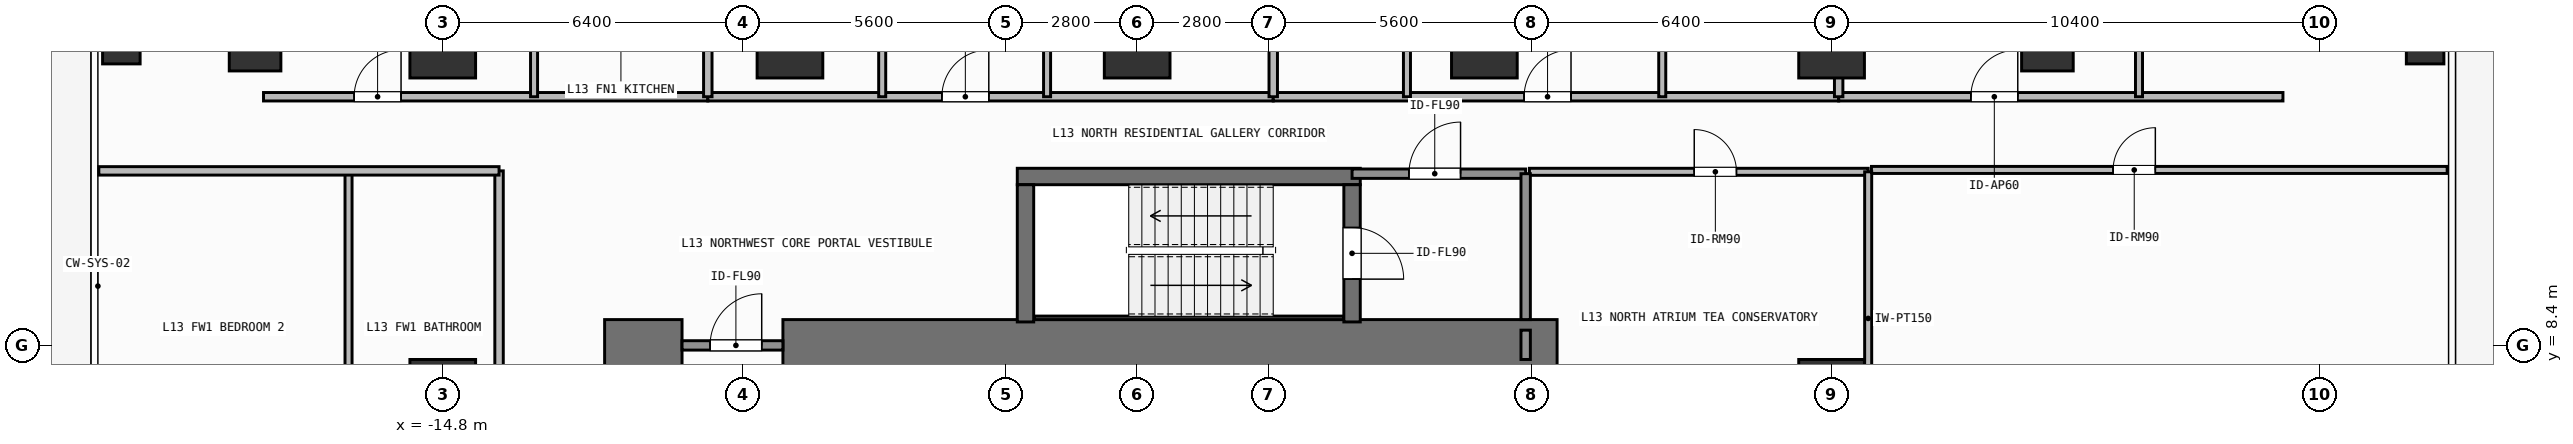
"""IFC4 building model, lengths in metres.
Left out: names, types, materials, properties, quantities, classifications, styles, units other than length and angle.
Written with IfcOpenShell. Run it as: python <this file> out.ifc"""

import sys

from ifc_helpers import new_model, si_unit, direction, frame, frame_2d, origin, origin_2d, place, context, subcontext, project, spatial, rectangle, hollow_rectangle, extrude, element, fill, save


model = new_model("IFC4")
c1 = context("Model", 3, precision=1e-05, world=origin(), true_north=direction((0.0, 1.0)))
c2 = subcontext(c1, "Body", "Model", "MODEL_VIEW")
j1 = project(units=[si_unit("LENGTHUNIT", "METRE"), si_unit("PLANEANGLEUNIT", "RADIAN")], contexts=[c1])
p1 = place(None, origin())
s1 = spatial("IfcSite", under=j1, at=p1, CompositionType="ELEMENT")
p2 = place(p1, origin())
s2 = spatial("IfcBuilding", under=s1, at=p2, CompositionType="ELEMENT")
p3 = place(p2, frame((0.0, 0.0, 50.1)))
s3 = spatial("IfcBuildingStorey", under=s2, at=p3, CompositionType="ELEMENT", Elevation=50.1)
p4 = place(p3, frame((-11.35, 8.4, 0.0), z_axis=(0.0, 0.0, 1.0), x_axis=(1.0, 0.0, 0.0)))
e1 = element("IfcWall", 1, at=p4, inside=s3, PredefinedType="SHEAR", context=c2, shape_type="SweptSolid", body=[
    extrude(rectangle(XDim=1.65, YDim=1.1, at=frame_2d((0.825, 0.0))), origin(), (0.0, 0.0, 1.0), 3.9),
])
p5 = place(p3, frame((-7.55, 8.4, 0.0), z_axis=(0.0, 0.0, 1.0), x_axis=(1.0, 0.0, 0.0)))
e2 = element("IfcWall", 2, at=p5, inside=s3, PredefinedType="SHEAR", context=c2, shape_type="SweptSolid", body=[
    extrude(rectangle(XDim=16.5, YDim=1.1, at=frame_2d((8.25, 0.0))), origin(), (0.0, 0.0, 1.0), 3.9),
])
p6 = place(p3, frame((-2.555, 12.0, 0.0), z_axis=(0.0, 0.0, 1.0), x_axis=(1.0, 0.0, 0.0)))
e3 = element("IfcWall", 3, at=p6, inside=s3, PredefinedType="SHEAR", context=c2, shape_type="SweptSolid", body=[
    extrude(rectangle(XDim=7.31, YDim=0.35, at=frame_2d((3.655, 0.0))), origin(), (0.0, 0.0, 1.0), 3.9),
])
p7 = place(p3, frame((-2.2, 8.988, 0.0), z_axis=(0.0, 0.0, 1.0), x_axis=(1.0, 0.0, 0.0)))
e4 = element("IfcWall", 4, at=p7, inside=s3, PredefinedType="SHEAR", context=c2, shape_type="SweptSolid", body=[
    extrude(rectangle(XDim=6.6, YDim=0.075, at=frame_2d((3.3, 0.0))), origin(), (0.0, 0.0, 1.0), 3.9),
])
p8 = place(p3, frame((-2.38, 8.9, 0.0), z_axis=(0.0, 0.0, 1.0), x_axis=(0.0, 1.0, 0.0)))
e5 = element("IfcWall", 5, at=p8, inside=s3, PredefinedType="SHEAR", context=c2, shape_type="SweptSolid", body=[
    extrude(rectangle(XDim=2.925, YDim=0.35, at=frame_2d((1.462, 0.0))), origin(), (0.0, 0.0, 1.0), 3.9),
])
p9 = place(p3, frame((4.58, 11.825, 0.0), z_axis=(0.0, 0.0, 1.0), x_axis=(0.0, -1.0, 0.0)))
e6 = element("IfcWall", 6, at=p9, inside=s3, PredefinedType="SHEAR", context=c2, shape_type="SweptSolid", body=[
    extrude(rectangle(XDim=2.925, YDim=0.35, at=frame_2d((1.462, 0.0))), origin(), (0.0, 0.0, 1.0), 3.9),
])
p10 = place(p9, frame((0.913, 0.0, 0.0)))
e7 = element("IfcOpeningElement", 7, at=p10, cuts=e6, PredefinedType="OPENING", context=c2, shape_type="SweptSolid", body=[
    extrude(rectangle(XDim=1.1, YDim=2.15, at=frame_2d((0.55, 1.075))), frame((0.0, 0.185, 0.0), z_axis=(0.0, -1.0, 0.0), x_axis=(1.0, 0.0, 0.0)), (0.0, 0.0, 1.0), 0.37),
])
for number, where, z_axis, x_axis in (
    (8, (-14.8, 14.8, 0.0), (0.0, 0.0, 1.0), (1.0, 0.0, 0.0)),
    (9, (-7.4, 14.8, 0.0), (0.0, 0.0, 1.0), (1.0, 0.0, 0.0)),
    (10, (0.0, 14.8, 0.0), (0.0, 0.0, 1.0), (1.0, 0.0, 0.0)),
    (11, (7.4, 14.8, 0.0), (0.0, 0.0, 1.0), (1.0, 0.0, 0.0)),
    (12, (14.8, 14.8, 0.0), (0.0, 0.0, 1.0), (1.0, 0.0, 0.0)),
    (13, (-14.8, 7.4, 0.0), (0.0, 0.0, 1.0), (1.0, 0.0, 0.0)),
    (14, (14.8, 7.4, 0.0), (0.0, 0.0, 1.0), (1.0, 0.0, 0.0)),
):
    element("IfcColumn", number, at=place(p3, frame(where, z_axis=z_axis, x_axis=x_axis)), inside=s3, PredefinedType="COLUMN", context=c2, shape_type="SweptSolid", body=[
        extrude(rectangle(XDim=1.4, YDim=1.4, at=origin_2d()), origin(), (0.0, 0.0, 1.0), 3.9),
    ])
for number, where, z_axis, x_axis in (
    (15, (-18.8, 14.8, 0.0), (0.0, 0.0, 1.0), (1.0, 0.0, 0.0)),
    (16, (19.4, 14.8, 0.0), (0.0, 0.0, 1.0), (1.0, 0.0, 0.0)),
):
    element("IfcColumn", number, at=place(p3, frame(where, z_axis=z_axis, x_axis=x_axis)), inside=s3, PredefinedType="COLUMN", context=c2, shape_type="SweptSolid", body=[
        extrude(rectangle(XDim=1.1, YDim=1.1, at=origin_2d()), origin(), (0.0, 0.0, 1.0), 3.9),
    ])
for number, where, z_axis, x_axis in (
    (17, (-21.65, 14.8, 0.0), (0.0, 0.0, 1.0), (1.0, 0.0, 0.0)),
    (18, (27.45, 14.8, 0.0), (0.0, 0.0, 1.0), (1.0, 0.0, 0.0)),
):
    element("IfcColumn", number, at=place(p3, frame(where, z_axis=z_axis, x_axis=x_axis)), inside=s3, PredefinedType="COLUMN", context=c2, shape_type="SweptSolid", body=[
        extrude(hollow_rectangle(XDim=0.8, YDim=0.8, WallThickness=0.036, at=origin_2d()), origin(), (0.0, 0.0, 1.0), 3.9),
    ])
p11 = place(p3, frame((4.58, 12.06, 0.0), z_axis=(0.0, 0.0, 1.0), x_axis=(1.0, 0.0, 0.0)))
e19 = element("IfcWall", 19, at=p11, inside=s3, PredefinedType="SOLIDWALL", context=c2, shape_type="SweptSolid", body=[
    extrude(rectangle(XDim=3.7, YDim=0.2, at=frame_2d((1.85, 0.0))), origin(), (0.0, 0.0, 1.0), 3.62),
])
p12 = place(p11, frame((1.212, 0.0, 0.0)))
e20 = element("IfcOpeningElement", 20, at=p12, cuts=e19, PredefinedType="OPENING", context=c2, shape_type="SweptSolid", body=[
    extrude(rectangle(XDim=1.1, YDim=2.15, at=frame_2d((0.55, 1.075))), frame((0.0, 0.11, 0.0), z_axis=(0.0, -1.0, 0.0), x_axis=(1.0, 0.0, 0.0)), (0.0, 0.0, 1.0), 0.22),
])
p13 = place(p3, frame((-9.7, 8.4, 0.0), z_axis=(0.0, 0.0, 1.0), x_axis=(1.0, 0.0, 0.0)))
e21 = element("IfcWall", 21, at=p13, inside=s3, PredefinedType="SOLIDWALL", context=c2, shape_type="SweptSolid", body=[
    extrude(rectangle(XDim=2.15, YDim=0.2, at=frame_2d((1.075, 0.0))), origin(), (0.0, 0.0, 1.0), 2.66),
])
p14 = place(p13, frame((0.598, 0.0, 0.0)))
e22 = element("IfcOpeningElement", 22, at=p14, cuts=e21, PredefinedType="OPENING", context=c2, shape_type="SweptSolid", body=[
    extrude(rectangle(XDim=1.1, YDim=2.15, at=frame_2d((0.55, 1.075))), frame((0.0, 0.11, 0.0), z_axis=(0.0, -1.0, 0.0), x_axis=(1.0, 0.0, 0.0)), (0.0, 0.0, 1.0), 0.22),
])
p15 = place(p3, frame((8.36, 12.1, 0.0), z_axis=(0.0, 0.0, 1.0), x_axis=(1.0, 0.0, 0.0)))
e23 = element("IfcWall", 23, at=p15, inside=s3, PredefinedType="PARTITIONING", context=c2, shape_type="SweptSolid", body=[
    extrude(rectangle(XDim=7.22, YDim=0.15, at=frame_2d((3.61, 0.0))), origin(), (0.0, 0.0, 1.0), 3.62),
])
p16 = place(p15, frame((3.513, 0.0, 0.0)))
e24 = element("IfcOpeningElement", 24, at=p16, cuts=e23, PredefinedType="OPENING", context=c2, shape_type="SweptSolid", body=[
    extrude(rectangle(XDim=0.9, YDim=2.1, at=frame_2d((0.45, 1.05))), frame((0.0, 0.085, 0.0), z_axis=(0.0, -1.0, 0.0), x_axis=(1.0, 0.0, 0.0)), (0.0, 0.0, 1.0), 0.17),
])
p17 = place(p3, frame((-18.62, 13.7, 0.0), z_axis=(0.0, 0.0, 1.0), x_axis=(1.0, 0.0, 0.0)))
e25 = element("IfcWall", 25, at=p17, inside=s3, PredefinedType="PARTITIONING", context=c2, shape_type="SweptSolid", body=[
    extrude(rectangle(XDim=9.469, YDim=0.18, at=frame_2d((4.735, 0.0))), origin(), (0.0, 0.0, 1.0), 3.62),
])
p18 = place(p17, frame((1.931, 0.0, 0.0)))
e26 = element("IfcOpeningElement", 26, at=p18, cuts=e25, PredefinedType="OPENING", context=c2, shape_type="SweptSolid", body=[
    extrude(rectangle(XDim=1.0, YDim=2.2, at=frame_2d((0.5, 1.1))), frame((0.0, 0.1, 0.0), z_axis=(0.0, -1.0, 0.0), x_axis=(1.0, 0.0, 0.0)), (0.0, 0.0, 1.0), 0.2),
])
p19 = place(p3, frame((-12.854, 13.7, 0.0), z_axis=(0.0, 0.0, 1.0), x_axis=(0.0, 1.0, 0.0)))
e27 = element("IfcWall", 27, at=p19, inside=s3, PredefinedType="PARTITIONING", context=c2, shape_type="SweptSolid", body=[
    extrude(rectangle(XDim=3.899, YDim=0.15, at=frame_2d((1.95, 0.0))), origin(), (0.0, 0.0, 1.0), 3.62),
])
p20 = place(p19, frame((1.865, 0.0, 0.0)))
e28 = element("IfcOpeningElement", 28, at=p20, cuts=e27, PredefinedType="OPENING", context=c2, shape_type="SweptSolid", body=[
    extrude(rectangle(XDim=0.85, YDim=2.1, at=frame_2d((0.425, 1.05))), frame((0.0, 0.085, 0.0), z_axis=(0.0, -1.0, 0.0), x_axis=(1.0, 0.0, 0.0)), (0.0, 0.0, 1.0), 0.17),
])
p21 = place(p3, frame((-9.151, 13.7, 0.0), z_axis=(0.0, 0.0, 1.0), x_axis=(1.0, 0.0, 0.0)))
e29 = element("IfcWall", 29, at=p21, inside=s3, PredefinedType="PARTITIONING", context=c2, shape_type="SweptSolid", body=[
    extrude(rectangle(XDim=12.051, YDim=0.18, at=frame_2d((6.025, 0.0))), origin(), (0.0, 0.0, 1.0), 3.62),
])
p22 = place(p21, frame((4.989, 0.0, 0.0)))
e30 = element("IfcOpeningElement", 30, at=p22, cuts=e29, PredefinedType="OPENING", context=c2, shape_type="SweptSolid", body=[
    extrude(rectangle(XDim=1.0, YDim=2.2, at=frame_2d((0.5, 1.1))), frame((0.0, 0.1, 0.0), z_axis=(0.0, -1.0, 0.0), x_axis=(1.0, 0.0, 0.0)), (0.0, 0.0, 1.0), 0.2),
])
p23 = place(p3, frame((-5.434, 13.7, 0.0), z_axis=(0.0, 0.0, 1.0), x_axis=(0.0, 1.0, 0.0)))
e31 = element("IfcWall", 31, at=p23, inside=s3, PredefinedType="PARTITIONING", context=c2, shape_type="SweptSolid", body=[
    extrude(rectangle(XDim=7.09, YDim=0.15, at=frame_2d((3.545, 0.0))), origin(), (0.0, 0.0, 1.0), 3.62),
])
p24 = place(p23, frame((3.03, 0.0, 0.0)))
e32 = element("IfcOpeningElement", 32, at=p24, cuts=e31, PredefinedType="OPENING", context=c2, shape_type="SweptSolid", body=[
    extrude(rectangle(XDim=0.85, YDim=2.1, at=frame_2d((0.425, 1.05))), frame((0.0, 0.085, 0.0), z_axis=(0.0, -1.0, 0.0), x_axis=(1.0, 0.0, 0.0)), (0.0, 0.0, 1.0), 0.17),
])
p25 = place(p3, frame((-1.92, 13.7, 0.0), z_axis=(0.0, 0.0, 1.0), x_axis=(0.0, 1.0, 0.0)))
e33 = element("IfcWall", 33, at=p25, inside=s3, PredefinedType="PARTITIONING", context=c2, shape_type="SweptSolid", body=[
    extrude(rectangle(XDim=4.963, YDim=0.15, at=frame_2d((2.481, 0.0))), origin(), (0.0, 0.0, 1.0), 3.62),
])
p26 = place(p25, frame((2.056, 0.0, 0.0)))
e34 = element("IfcOpeningElement", 34, at=p26, cuts=e33, PredefinedType="OPENING", context=c2, shape_type="SweptSolid", body=[
    extrude(rectangle(XDim=0.85, YDim=2.1, at=frame_2d((0.425, 1.05))), frame((0.0, 0.085, 0.0), z_axis=(0.0, -1.0, 0.0), x_axis=(1.0, 0.0, 0.0)), (0.0, 0.0, 1.0), 0.17),
])
p27 = place(p3, frame((2.9, 13.7, 0.0), z_axis=(0.0, 0.0, 1.0), x_axis=(1.0, 0.0, 0.0)))
e35 = element("IfcWall", 35, at=p27, inside=s3, PredefinedType="PARTITIONING", context=c2, shape_type="SweptSolid", body=[
    extrude(rectangle(XDim=12.051, YDim=0.18, at=frame_2d((6.025, 0.0))), origin(), (0.0, 0.0, 1.0), 3.62),
])
p28 = place(p27, frame((5.347, 0.0, 0.0)))
e36 = element("IfcOpeningElement", 36, at=p28, cuts=e35, PredefinedType="OPENING", context=c2, shape_type="SweptSolid", body=[
    extrude(rectangle(XDim=1.0, YDim=2.2, at=frame_2d((0.5, 1.1))), frame((0.0, 0.1, 0.0), z_axis=(0.0, -1.0, 0.0), x_axis=(1.0, 0.0, 0.0)), (0.0, 0.0, 1.0), 0.2),
])
p29 = place(p3, frame((5.75, 13.7, 0.0), z_axis=(0.0, 0.0, 1.0), x_axis=(0.0, 1.0, 0.0)))
e37 = element("IfcWall", 37, at=p29, inside=s3, PredefinedType="PARTITIONING", context=c2, shape_type="SweptSolid", body=[
    extrude(rectangle(XDim=7.09, YDim=0.15, at=frame_2d((3.545, 0.0))), origin(), (0.0, 0.0, 1.0), 3.62),
])
p30 = place(p29, frame((3.03, 0.0, 0.0)))
e38 = element("IfcOpeningElement", 38, at=p30, cuts=e37, PredefinedType="OPENING", context=c2, shape_type="SweptSolid", body=[
    extrude(rectangle(XDim=0.85, YDim=2.1, at=frame_2d((0.425, 1.05))), frame((0.0, 0.085, 0.0), z_axis=(0.0, -1.0, 0.0), x_axis=(1.0, 0.0, 0.0)), (0.0, 0.0, 1.0), 0.17),
])
p31 = place(p3, frame((11.191, 13.7, 0.0), z_axis=(0.0, 0.0, 1.0), x_axis=(0.0, 1.0, 0.0)))
e39 = element("IfcWall", 39, at=p31, inside=s3, PredefinedType="PARTITIONING", context=c2, shape_type="SweptSolid", body=[
    extrude(rectangle(XDim=4.857, YDim=0.15, at=frame_2d((2.428, 0.0))), origin(), (0.0, 0.0, 1.0), 3.62),
])
p32 = place(p31, frame((1.916, 0.0, 0.0)))
e40 = element("IfcOpeningElement", 40, at=p32, cuts=e39, PredefinedType="OPENING", context=c2, shape_type="SweptSolid", body=[
    extrude(rectangle(XDim=0.85, YDim=2.1, at=frame_2d((0.425, 1.05))), frame((0.0, 0.085, 0.0), z_axis=(0.0, -1.0, 0.0), x_axis=(1.0, 0.0, 0.0)), (0.0, 0.0, 1.0), 0.17),
])
p33 = place(p3, frame((14.951, 13.7, 0.0), z_axis=(0.0, 0.0, 1.0), x_axis=(1.0, 0.0, 0.0)))
e41 = element("IfcWall", 41, at=p33, inside=s3, PredefinedType="PARTITIONING", context=c2, shape_type="SweptSolid", body=[
    extrude(rectangle(XDim=9.469, YDim=0.18, at=frame_2d((4.734, 0.0))), origin(), (0.0, 0.0, 1.0), 3.62),
])
p34 = place(p33, frame((2.817, 0.0, 0.0)))
e42 = element("IfcOpeningElement", 42, at=p34, cuts=e41, PredefinedType="OPENING", context=c2, shape_type="SweptSolid", body=[
    extrude(rectangle(XDim=1.0, YDim=2.2, at=frame_2d((0.5, 1.1))), frame((0.0, 0.1, 0.0), z_axis=(0.0, -1.0, 0.0), x_axis=(1.0, 0.0, 0.0)), (0.0, 0.0, 1.0), 0.2),
])
p35 = place(p3, frame((21.352, 13.7, 0.0), z_axis=(0.0, 0.0, 1.0), x_axis=(0.0, 1.0, 0.0)))
e43 = element("IfcWall", 43, at=p35, inside=s3, PredefinedType="PARTITIONING", context=c2, shape_type="SweptSolid", body=[
    extrude(rectangle(XDim=3.899, YDim=0.15, at=frame_2d((1.95, 0.0))), origin(), (0.0, 0.0, 1.0), 3.122),
])
p36 = place(p35, frame((1.695, 0.0, 0.0)))
e44 = element("IfcOpeningElement", 44, at=p36, cuts=e43, PredefinedType="OPENING", context=c2, shape_type="SweptSolid", body=[
    extrude(rectangle(XDim=0.85, YDim=2.1, at=frame_2d((0.425, 1.05))), frame((0.0, 0.085, 0.0), z_axis=(0.0, -1.0, 0.0), x_axis=(1.0, 0.0, 0.0)), (0.0, 0.0, 1.0), 0.17),
])
p37 = place(p3, frame((-13.6, -12.12, 0.0), z_axis=(0.0, 0.0, 1.0), x_axis=(0.0, 1.0, 0.0)))
e45 = element("IfcWall", 45, at=p37, inside=s3, PredefinedType="PARTITIONING", context=c2, shape_type="SweptSolid", body=[
    extrude(rectangle(XDim=24.24, YDim=0.18, at=frame_2d((12.12, 0.0))), origin(), (0.0, 0.0, 1.0), 3.62),
])
p38 = place(p37, frame((9.829, 0.0, 0.0)))
e46 = element("IfcOpeningElement", 46, at=p38, cuts=e45, PredefinedType="OPENING", context=c2, shape_type="SweptSolid", body=[
    extrude(rectangle(XDim=1.0, YDim=2.2, at=frame_2d((0.5, 1.1))), frame((0.0, 0.1, 0.0), z_axis=(0.0, -1.0, 0.0), x_axis=(1.0, 0.0, 0.0)), (0.0, 0.0, 1.0), 0.2),
])
p39 = place(p3, frame((15.65, 12.14, 0.0), z_axis=(0.0, 0.0, 1.0), x_axis=(1.0, 0.0, 0.0)))
e47 = element("IfcWall", 47, at=p39, inside=s3, PredefinedType="PARTITIONING", context=c2, shape_type="SweptSolid", body=[
    extrude(rectangle(XDim=12.27, YDim=0.15, at=frame_2d((6.135, 0.0))), origin(), (0.0, 0.0, 1.0), 3.62),
])
p40 = place(p39, frame((5.15, 0.0, 0.0)))
e48 = element("IfcOpeningElement", 48, at=p40, cuts=e47, PredefinedType="OPENING", context=c2, shape_type="SweptSolid", body=[
    extrude(rectangle(XDim=0.9, YDim=2.1, at=frame_2d((0.45, 1.05))), frame((0.0, 0.085, 0.0), z_axis=(0.0, -1.0, 0.0), x_axis=(1.0, 0.0, 0.0)), (0.0, 0.0, 1.0), 0.17),
])
p41 = place(p3, frame((8.28, 8.95, 0.0), z_axis=(0.0, 0.0, 1.0), x_axis=(0.0, 1.0, 0.0)))
e49 = element("IfcWall", 49, at=p41, inside=s3, PredefinedType="SOLIDWALL", context=c2, shape_type="SweptSolid", body=[
    extrude(rectangle(XDim=3.11, YDim=0.2, at=frame_2d((1.555, 0.0))), origin(), (0.0, 0.0, 1.0), 3.62),
])
p42 = place(p3, frame((8.28, 8.1, 0.0), z_axis=(0.0, 0.0, 1.0), x_axis=(0.0, 1.0, 0.0)))
e50 = element("IfcWall", 50, at=p42, inside=s3, PredefinedType="SOLIDWALL", context=c2, shape_type="SweptSolid", body=[
    extrude(rectangle(XDim=0.625, YDim=0.2, at=frame_2d((0.312, 0.0))), origin(), (0.0, 0.0, 1.0), 3.62),
])
p43 = place(p3, frame((15.58, 5.85, 0.0), z_axis=(0.0, 0.0, 1.0), x_axis=(0.0, 1.0, 0.0)))
e51 = element("IfcWall", 51, at=p43, inside=s3, PredefinedType="PARTITIONING", context=c2, shape_type="SweptSolid", body=[
    extrude(rectangle(XDim=6.25, YDim=0.15, at=frame_2d((3.125, 0.0))), origin(), (0.0, 0.0, 1.0), 3.62),
])
for number, where, z_axis, x_axis in (
    (52, (-9.151, 13.7, 0.0), (0.0, 0.0, 1.0), (0.0, 1.0, 0.0)),
    (53, (2.9, 13.7, 0.0), (0.0, 0.0, 1.0), (0.0, 1.0, 0.0)),
):
    element("IfcWall", number, at=place(p3, frame(where, z_axis=z_axis, x_axis=x_axis)), inside=s3, PredefinedType="PARTITIONING", context=c2, shape_type="SweptSolid", body=[
        extrude(rectangle(XDim=11.33, YDim=0.18, at=frame_2d((5.665, 0.0))), origin(), (0.0, 0.0, 1.0), 3.62),
    ])
p44 = place(p3, frame((14.951, 13.7, 0.0), z_axis=(0.0, 0.0, 1.0), x_axis=(0.0, 1.0, 0.0)))
e54 = element("IfcWall", 54, at=p44, inside=s3, PredefinedType="PARTITIONING", context=c2, shape_type="SweptSolid", body=[
    extrude(rectangle(XDim=11.33, YDim=0.18, at=frame_2d((5.665, 0.0))), origin(), (0.0, 0.0, 1.0), 2.71),
])
p45 = place(p3, frame((-16.808, 5.436, 0.0), z_axis=(0.0, 0.0, 1.0), x_axis=(0.0, 1.0, 0.0)))
e55 = element("IfcWall", 55, at=p45, inside=s3, PredefinedType="PARTITIONING", context=c2, shape_type="SweptSolid", body=[
    extrude(rectangle(XDim=6.684, YDim=0.15, at=frame_2d((3.342, 0.0))), origin(), (0.0, 0.0, 1.0), 3.62),
])
p46 = place(p3, frame((-22.13, 12.12, 0.0), z_axis=(0.0, 0.0, 1.0), x_axis=(1.0, 0.0, 0.0)))
e56 = element("IfcWall", 56, at=p46, inside=s3, PredefinedType="PARTITIONING", context=c2, shape_type="SweptSolid", body=[
    extrude(rectangle(XDim=8.53, YDim=0.18, at=frame_2d((4.265, 0.0))), origin(), (0.0, 0.0, 1.0), 3.62),
])
p47 = place(p10, origin())
e57 = element("IfcDoor", 57, at=p47, inside=s3, OperationType="SINGLE_SWING_RIGHT", PredefinedType="DOOR", context=c2, shape_type="SweptSolid", body=[
    extrude(rectangle(XDim=1.1, YDim=2.15, at=frame_2d((0.55, 1.075))), frame((0.0, 0.025, 0.0), z_axis=(0.0, -1.0, 0.0), x_axis=(1.0, 0.0, 0.0)), (0.0, 0.0, 1.0), 0.05),
])
fill(e7, e57)
p48 = place(p12, origin())
e58 = element("IfcDoor", 58, at=p48, inside=s3, OperationType="SINGLE_SWING_RIGHT", PredefinedType="DOOR", context=c2, shape_type="SweptSolid", body=[
    extrude(rectangle(XDim=1.1, YDim=2.15, at=frame_2d((0.55, 1.075))), frame((0.0, 0.025, 0.0), z_axis=(0.0, -1.0, 0.0), x_axis=(1.0, 0.0, 0.0)), (0.0, 0.0, 1.0), 0.05),
])
fill(e20, e58)
p49 = place(p14, origin())
e59 = element("IfcDoor", 59, at=p49, inside=s3, OperationType="SINGLE_SWING_RIGHT", PredefinedType="DOOR", context=c2, shape_type="SweptSolid", body=[
    extrude(rectangle(XDim=1.1, YDim=2.15, at=frame_2d((0.55, 1.075))), frame((0.0, 0.025, 0.0), z_axis=(0.0, -1.0, 0.0), x_axis=(1.0, 0.0, 0.0)), (0.0, 0.0, 1.0), 0.05),
])
fill(e22, e59)
p50 = place(p16, origin())
e60 = element("IfcDoor", 60, at=p50, inside=s3, OperationType="SINGLE_SWING_LEFT", PredefinedType="DOOR", context=c2, shape_type="SweptSolid", body=[
    extrude(rectangle(XDim=0.9, YDim=2.1, at=frame_2d((0.45, 1.05))), frame((0.0, 0.025, 0.0), z_axis=(0.0, -1.0, 0.0), x_axis=(1.0, 0.0, 0.0)), (0.0, 0.0, 1.0), 0.05),
])
fill(e24, e60)
p51 = place(p18, origin())
e61 = element("IfcDoor", 61, at=p51, inside=s3, OperationType="SINGLE_SWING_RIGHT", PredefinedType="DOOR", context=c2, shape_type="SweptSolid", body=[
    extrude(rectangle(XDim=1.0, YDim=2.2, at=frame_2d((0.5, 1.1))), frame((0.0, 0.025, 0.0), z_axis=(0.0, -1.0, 0.0), x_axis=(1.0, 0.0, 0.0)), (0.0, 0.0, 1.0), 0.05),
])
fill(e26, e61)
p52 = place(p22, origin())
e62 = element("IfcDoor", 62, at=p52, inside=s3, OperationType="SINGLE_SWING_RIGHT", PredefinedType="DOOR", context=c2, shape_type="SweptSolid", body=[
    extrude(rectangle(XDim=1.0, YDim=2.2, at=frame_2d((0.5, 1.1))), frame((0.0, 0.025, 0.0), z_axis=(0.0, -1.0, 0.0), x_axis=(1.0, 0.0, 0.0)), (0.0, 0.0, 1.0), 0.05),
])
fill(e30, e62)
p53 = place(p28, origin())
e63 = element("IfcDoor", 63, at=p53, inside=s3, OperationType="SINGLE_SWING_RIGHT", PredefinedType="DOOR", context=c2, shape_type="SweptSolid", body=[
    extrude(rectangle(XDim=1.0, YDim=2.2, at=frame_2d((0.5, 1.1))), frame((0.0, 0.025, 0.0), z_axis=(0.0, -1.0, 0.0), x_axis=(1.0, 0.0, 0.0)), (0.0, 0.0, 1.0), 0.05),
])
fill(e36, e63)
p54 = place(p34, origin())
e64 = element("IfcDoor", 64, at=p54, inside=s3, OperationType="SINGLE_SWING_RIGHT", PredefinedType="DOOR", context=c2, shape_type="SweptSolid", body=[
    extrude(rectangle(XDim=1.0, YDim=2.2, at=frame_2d((0.5, 1.1))), frame((0.0, 0.025, 0.0), z_axis=(0.0, -1.0, 0.0), x_axis=(1.0, 0.0, 0.0)), (0.0, 0.0, 1.0), 0.05),
])
fill(e42, e64)
p55 = place(p40, origin())
e65 = element("IfcDoor", 65, at=p55, inside=s3, OperationType="SINGLE_SWING_RIGHT", PredefinedType="DOOR", context=c2, shape_type="SweptSolid", body=[
    extrude(rectangle(XDim=0.9, YDim=2.1, at=frame_2d((0.45, 1.05))), frame((0.0, 0.025, 0.0), z_axis=(0.0, -1.0, 0.0), x_axis=(1.0, 0.0, 0.0)), (0.0, 0.0, 1.0), 0.05),
])
fill(e48, e65)
save(model, sys.argv[1])
